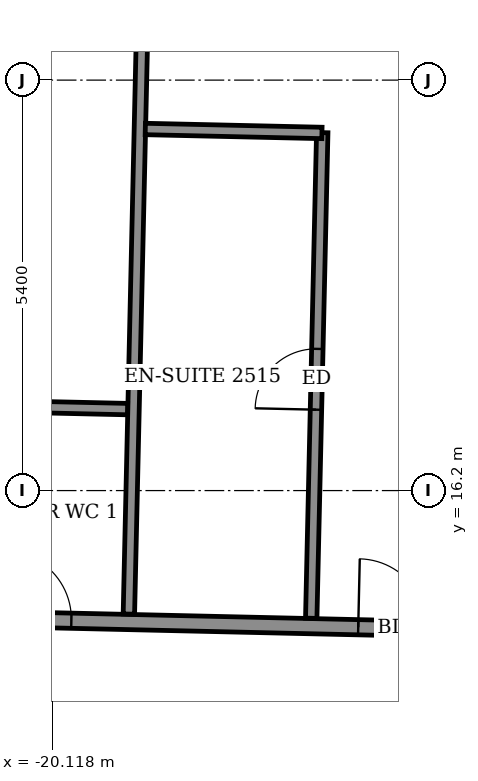
"""IFC4 building model, lengths in metres.
Left out: names, types, materials, properties, quantities, classifications, styles, units other than length and angle.
Written with IfcOpenShell. Run it as: python <this file> out.ifc"""

import sys

from ifc_helpers import new_model, si_unit, direction, frame, frame_2d, origin, place, context, subcontext, project, spatial, rectangle, extrude, element, fill, save


model = new_model("IFC4")
c1 = context("Model", 3, precision=1e-05, world=origin(), true_north=direction((0.0, 1.0)))
c2 = subcontext(c1, "Body", "Model", "MODEL_VIEW")
j1 = project(units=[si_unit("LENGTHUNIT", "METRE"), si_unit("PLANEANGLEUNIT", "RADIAN")], contexts=[c1])
p1 = place(None, origin())
s1 = spatial("IfcSite", under=j1, at=p1, CompositionType="ELEMENT")
p2 = place(p1, origin())
s2 = spatial("IfcBuilding", under=s1, at=p2, CompositionType="ELEMENT")
p3 = place(p2, frame((0.0, 0.0, 101.9)))
s3 = spatial("IfcBuildingStorey", under=s2, at=p3, CompositionType="ELEMENT", Elevation=101.9)
p4 = place(p3, frame((-26.316, 14.634, 0.0), z_axis=(0.0, 0.0, 1.0), x_axis=(0.999742734556, -0.02268181435, 0.0)))
e1 = element("IfcWall", 1, at=p4, inside=s3, PredefinedType="PARTITIONING", context=c2, shape_type="SweptSolid", body=[
    extrude(rectangle(XDim=50.708, YDim=0.2, at=frame_2d((25.354, 0.0))), origin(), (0.0, 0.0, 1.0), 3.05),
])
p5 = place(p4, frame((48.229, 0.0, 0.0)))
e2 = element("IfcOpeningElement", 2, at=p5, cuts=e1, PredefinedType="OPENING", context=c2, shape_type="SweptSolid", body=[
    extrude(rectangle(XDim=1.0, YDim=2.1, at=frame_2d((0.5, 1.05))), frame((0.0, 0.11, 0.0), z_axis=(0.0, -1.0, 0.0), x_axis=(1.0, 0.0, 0.0)), (0.0, 0.0, 1.0), 0.22),
])
p6 = place(p4, frame((43.6, 0.0, 0.0)))
e3 = element("IfcOpeningElement", 3, at=p6, cuts=e1, PredefinedType="OPENING", context=c2, shape_type="SweptSolid", body=[
    extrude(rectangle(XDim=0.9, YDim=2.1, at=frame_2d((0.45, 1.05))), frame((0.0, 0.11, 0.0), z_axis=(0.0, -1.0, 0.0), x_axis=(1.0, 0.0, 0.0)), (0.0, 0.0, 1.0), 0.22),
])
p7 = place(p4, frame((38.925, 0.0, 0.0)))
e4 = element("IfcOpeningElement", 4, at=p7, cuts=e1, PredefinedType="OPENING", context=c2, shape_type="SweptSolid", body=[
    extrude(rectangle(XDim=0.9, YDim=2.1, at=frame_2d((0.45, 1.05))), frame((0.0, 0.11, 0.0), z_axis=(0.0, -1.0, 0.0), x_axis=(1.0, 0.0, 0.0)), (0.0, 0.0, 1.0), 0.22),
])
p8 = place(p4, frame((36.9, 0.0, 0.0)))
e5 = element("IfcOpeningElement", 5, at=p8, cuts=e1, PredefinedType="OPENING", context=c2, shape_type="SweptSolid", body=[
    extrude(rectangle(XDim=0.9, YDim=2.1, at=frame_2d((0.45, 1.05))), frame((0.0, 0.11, 0.0), z_axis=(0.0, -1.0, 0.0), x_axis=(1.0, 0.0, 0.0)), (0.0, 0.0, 1.0), 0.22),
])
p9 = place(p4, frame((29.975, 0.0, 0.0)))
e6 = element("IfcOpeningElement", 6, at=p9, cuts=e1, PredefinedType="OPENING", context=c2, shape_type="SweptSolid", body=[
    extrude(rectangle(XDim=0.9, YDim=2.1, at=frame_2d((0.45, 1.05))), frame((0.0, 0.11, 0.0), z_axis=(0.0, -1.0, 0.0), x_axis=(1.0, 0.0, 0.0)), (0.0, 0.0, 1.0), 0.22),
])
p10 = place(p4, frame((27.9, 0.0, 0.0)))
e7 = element("IfcOpeningElement", 7, at=p10, cuts=e1, PredefinedType="OPENING", context=c2, shape_type="SweptSolid", body=[
    extrude(rectangle(XDim=0.9, YDim=2.1, at=frame_2d((0.45, 1.05))), frame((0.0, 0.11, 0.0), z_axis=(0.0, -1.0, 0.0), x_axis=(1.0, 0.0, 0.0)), (0.0, 0.0, 1.0), 0.22),
])
p11 = place(p4, frame((21.175, 0.0, 0.0)))
e8 = element("IfcOpeningElement", 8, at=p11, cuts=e1, PredefinedType="OPENING", context=c2, shape_type="SweptSolid", body=[
    extrude(rectangle(XDim=0.9, YDim=2.1, at=frame_2d((0.45, 1.05))), frame((0.0, 0.11, 0.0), z_axis=(0.0, -1.0, 0.0), x_axis=(1.0, 0.0, 0.0)), (0.0, 0.0, 1.0), 0.22),
])
p12 = place(p4, frame((19.25, 0.0, 0.0)))
e9 = element("IfcOpeningElement", 9, at=p12, cuts=e1, PredefinedType="OPENING", context=c2, shape_type="SweptSolid", body=[
    extrude(rectangle(XDim=0.9, YDim=2.1, at=frame_2d((0.45, 1.05))), frame((0.0, 0.11, 0.0), z_axis=(0.0, -1.0, 0.0), x_axis=(1.0, 0.0, 0.0)), (0.0, 0.0, 1.0), 0.22),
])
p13 = place(p4, frame((12.375, 0.0, 0.0)))
e10 = element("IfcOpeningElement", 10, at=p13, cuts=e1, PredefinedType="OPENING", context=c2, shape_type="SweptSolid", body=[
    extrude(rectangle(XDim=0.9, YDim=2.1, at=frame_2d((0.45, 1.05))), frame((0.0, 0.11, 0.0), z_axis=(0.0, -1.0, 0.0), x_axis=(1.0, 0.0, 0.0)), (0.0, 0.0, 1.0), 0.22),
])
p14 = place(p4, frame((10.225, 0.0, 0.0)))
e11 = element("IfcOpeningElement", 11, at=p14, cuts=e1, PredefinedType="OPENING", context=c2, shape_type="SweptSolid", body=[
    extrude(rectangle(XDim=0.9, YDim=2.1, at=frame_2d((0.45, 1.05))), frame((0.0, 0.11, 0.0), z_axis=(0.0, -1.0, 0.0), x_axis=(1.0, 0.0, 0.0)), (0.0, 0.0, 1.0), 0.22),
])
p15 = place(p4, frame((0.85, 0.0, 0.0)))
e12 = element("IfcOpeningElement", 12, at=p15, cuts=e1, PredefinedType="OPENING", context=c2, shape_type="SweptSolid", body=[
    extrude(rectangle(XDim=1.0, YDim=2.1, at=frame_2d((0.5, 1.05))), frame((0.0, 0.11, 0.0), z_axis=(0.0, -1.0, 0.0), x_axis=(1.0, 0.0, 0.0)), (0.0, 0.0, 1.0), 0.22),
])
p16 = place(p4, frame((5.55, 0.0, 0.0)))
e13 = element("IfcOpeningElement", 13, at=p16, cuts=e1, PredefinedType="OPENING", context=c2, shape_type="SweptSolid", body=[
    extrude(rectangle(XDim=0.9, YDim=2.1, at=frame_2d((0.45, 1.05))), frame((0.0, 0.11, 0.0), z_axis=(0.0, -1.0, 0.0), x_axis=(1.0, 0.0, 0.0)), (0.0, 0.0, 1.0), 0.22),
])
p17 = place(p3, frame((-19.111, 14.575, 0.0), z_axis=(0.0, 0.0, 1.0), x_axis=(0.022684355347, 0.999742676904, 0.0)))
e14 = element("IfcWall", 14, at=p17, inside=s3, PredefinedType="PARTITIONING", context=c2, shape_type="SweptSolid", body=[
    extrude(rectangle(XDim=11.376, YDim=0.15, at=frame_2d((5.688, 0.0))), origin(), (0.0, 0.0, 1.0), 2.55),
])
p18 = place(p3, frame((-16.712, 14.52, 0.0), z_axis=(0.0, 0.0, 1.0), x_axis=(0.022692767652, 0.999742485991, 0.0)))
e15 = element("IfcWall", 15, at=p18, inside=s3, PredefinedType="PARTITIONING", context=c2, shape_type="SweptSolid", body=[
    extrude(rectangle(XDim=6.391, YDim=0.15, at=frame_2d((3.195, 0.0))), origin(), (0.0, 0.0, 1.0), 3.05),
])
p19 = place(p18, frame((2.745, 0.0, 0.0)))
e16 = element("IfcOpeningElement", 16, at=p19, cuts=e15, PredefinedType="OPENING", context=c2, shape_type="SweptSolid", body=[
    extrude(rectangle(XDim=0.8, YDim=2.1, at=frame_2d((0.4, 1.05))), frame((0.0, 0.085, 0.0), z_axis=(0.0, -1.0, 0.0), x_axis=(1.0, 0.0, 0.0)), (0.0, 0.0, 1.0), 0.17),
])
for number, where, z_axis, x_axis in (
    (17, (-21.453, 17.324, 0.0), (0.0, 0.0, 1.0), (1.0, -0.022, 0.0)),
    (18, (-18.895, 20.957, 0.0), (0.0, 0.0, 1.0), (1.0, -0.022, 0.0)),
):
    element("IfcWall", number, at=place(p3, frame(where, z_axis=z_axis, x_axis=x_axis)), inside=s3, PredefinedType="PARTITIONING", context=c2, shape_type="SweptSolid", body=[
        extrude(rectangle(XDim=2.324, YDim=0.15, at=frame_2d((1.162, 0.0))), origin(), (0.0, 0.0, 1.0), 3.05),
    ])
p20 = place(p14, origin())
e19 = element("IfcDoor", 19, at=p20, inside=s3, OperationType="SINGLE_SWING_LEFT", PredefinedType="DOOR", context=c2, shape_type="SweptSolid", body=[
    extrude(rectangle(XDim=0.9, YDim=2.1, at=frame_2d((0.45, 1.05))), frame((0.0, 0.025, 0.0), z_axis=(0.0, -1.0, 0.0), x_axis=(1.0, 0.0, 0.0)), (0.0, 0.0, 1.0), 0.05),
])
fill(e11, e19)
p21 = place(p19, origin())
e20 = element("IfcDoor", 20, at=p21, inside=s3, OperationType="SINGLE_SWING_LEFT", PredefinedType="DOOR", context=c2, shape_type="SweptSolid", body=[
    extrude(rectangle(XDim=0.8, YDim=2.1, at=frame_2d((0.4, 1.05))), frame((0.0, 0.025, 0.0), z_axis=(0.0, -1.0, 0.0), x_axis=(1.0, 0.0, 0.0)), (0.0, 0.0, 1.0), 0.05),
])
fill(e16, e20)
p22 = place(p16, origin())
e21 = element("IfcDoor", 21, at=p22, inside=s3, OperationType="SINGLE_SWING_LEFT", PredefinedType="DOOR", context=c2, shape_type="SweptSolid", body=[
    extrude(rectangle(XDim=0.9, YDim=2.1, at=frame_2d((0.45, 1.05))), frame((0.0, 0.025, 0.0), z_axis=(0.0, -1.0, 0.0), x_axis=(1.0, 0.0, 0.0)), (0.0, 0.0, 1.0), 0.05),
])
fill(e13, e21)
save(model, sys.argv[1])
